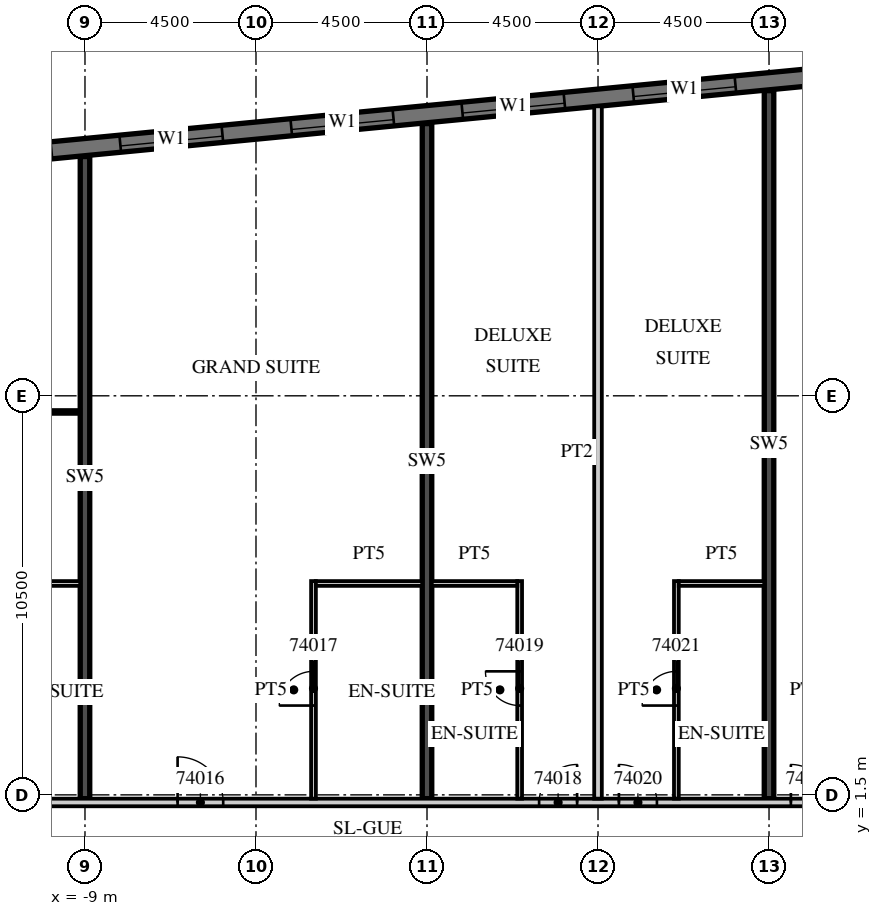
"""IFC4 building model, lengths in metres.
Left out: names, types, materials, properties, quantities, classifications, styles, units other than length and angle.
Written with IfcOpenShell. Run it as: python <this file> out.ifc"""

import sys

from ifc_helpers import new_model, si_unit, direction, frame, frame_2d, origin, place, context, subcontext, project, spatial, rectangle, extrude, element, fill, save


model = new_model("IFC4")
c1 = context("Model", 3, precision=1e-05, world=origin(), true_north=direction((0.0, 1.0)))
c2 = subcontext(c1, "Body", "Model", "MODEL_VIEW")
j1 = project(units=[si_unit("LENGTHUNIT", "METRE"), si_unit("PLANEANGLEUNIT", "RADIAN")], contexts=[c1])
p1 = place(None, origin())
s1 = spatial("IfcSite", under=j1, at=p1, CompositionType="ELEMENT")
p2 = place(p1, origin())
s2 = spatial("IfcBuilding", under=s1, at=p2, CompositionType="ELEMENT")
p3 = place(p2, frame((0.0, 0.0, 294.9)))
s3 = spatial("IfcBuildingStorey", under=s2, at=p3, CompositionType="ELEMENT", Elevation=294.9)
p4 = place(p3, frame((-9.0, 1.4, 0.0), z_axis=(0.0, 0.0, 1.0), x_axis=(0.0, 1.0, 0.0)))
e1 = element("IfcWall", 1, at=p4, inside=s3, PredefinedType="SHEAR", context=c2, shape_type="SweptSolid", body=[
    extrude(rectangle(XDim=16.896, YDim=0.25, at=frame_2d((8.448, 0.0))), origin(), (0.0, 0.0, 1.0), 3.3),
])
p5 = place(p3, frame((0.0, 1.4, 0.0), z_axis=(0.0, 0.0, 1.0), x_axis=(0.0, 1.0, 0.0)))
e2 = element("IfcWall", 2, at=p5, inside=s3, PredefinedType="SHEAR", context=c2, shape_type="SweptSolid", body=[
    extrude(rectangle(XDim=17.763, YDim=0.25, at=frame_2d((8.881, 0.0))), origin(), (0.0, 0.0, 1.0), 3.3),
])
p6 = place(p3, frame((9.0, 1.4, 0.0), z_axis=(0.0, 0.0, 1.0), x_axis=(0.0, 1.0, 0.0)))
e3 = element("IfcWall", 3, at=p6, inside=s3, PredefinedType="SHEAR", context=c2, shape_type="SweptSolid", body=[
    extrude(rectangle(XDim=18.629, YDim=0.25, at=frame_2d((9.315, 0.0))), origin(), (0.0, 0.0, 1.0), 3.3),
])
p7 = place(p3, frame((13.521, 20.713, 0.0), z_axis=(0.0, 0.0, 1.0), x_axis=(-0.995396277313, -0.095844932638, 0.0)))
e4 = element("IfcWall", 4, at=p7, inside=s3, PredefinedType="SOLIDWALL", context=c2, shape_type="SweptSolid", body=[
    extrude(rectangle(XDim=51.495, YDim=0.45, at=frame_2d((25.748, 0.0))), origin(), (0.0, 0.0, 1.0), 3.02),
])
p8 = place(p7, frame((0.91, 0.0, 0.45)))
e5 = element("IfcOpeningElement", 5, at=p8, cuts=e4, PredefinedType="OPENING", context=c2, shape_type="SweptSolid", body=[
    extrude(rectangle(XDim=2.7, YDim=2.25, at=frame_2d((1.35, 1.125))), frame((0.0, 0.235, 0.0), z_axis=(0.0, -1.0, 0.0), x_axis=(1.0, 0.0, 0.0)), (0.0, 0.0, 1.0), 0.47),
])
p9 = place(p7, frame((5.431, 0.0, 0.45)))
e6 = element("IfcOpeningElement", 6, at=p9, cuts=e4, PredefinedType="OPENING", context=c2, shape_type="SweptSolid", body=[
    extrude(rectangle(XDim=2.7, YDim=2.25, at=frame_2d((1.35, 1.125))), frame((0.0, 0.235, 0.0), z_axis=(0.0, -1.0, 0.0), x_axis=(1.0, 0.0, 0.0)), (0.0, 0.0, 1.0), 0.47),
])
p10 = place(p7, frame((9.952, 0.0, 0.45)))
e7 = element("IfcOpeningElement", 7, at=p10, cuts=e4, PredefinedType="OPENING", context=c2, shape_type="SweptSolid", body=[
    extrude(rectangle(XDim=2.7, YDim=2.25, at=frame_2d((1.35, 1.125))), frame((0.0, 0.235, 0.0), z_axis=(0.0, -1.0, 0.0), x_axis=(1.0, 0.0, 0.0)), (0.0, 0.0, 1.0), 0.47),
])
p11 = place(p7, frame((14.473, 0.0, 0.45)))
e8 = element("IfcOpeningElement", 8, at=p11, cuts=e4, PredefinedType="OPENING", context=c2, shape_type="SweptSolid", body=[
    extrude(rectangle(XDim=2.7, YDim=2.25, at=frame_2d((1.35, 1.125))), frame((0.0, 0.235, 0.0), z_axis=(0.0, -1.0, 0.0), x_axis=(1.0, 0.0, 0.0)), (0.0, 0.0, 1.0), 0.47),
])
p12 = place(p7, frame((18.994, 0.0, 0.45)))
e9 = element("IfcOpeningElement", 9, at=p12, cuts=e4, PredefinedType="OPENING", context=c2, shape_type="SweptSolid", body=[
    extrude(rectangle(XDim=2.7, YDim=2.25, at=frame_2d((1.35, 1.125))), frame((0.0, 0.235, 0.0), z_axis=(0.0, -1.0, 0.0), x_axis=(1.0, 0.0, 0.0)), (0.0, 0.0, 1.0), 0.47),
])
p13 = place(p7, frame((23.514, 0.0, 0.45)))
e10 = element("IfcOpeningElement", 10, at=p13, cuts=e4, PredefinedType="OPENING", context=c2, shape_type="SweptSolid", body=[
    extrude(rectangle(XDim=2.7, YDim=2.25, at=frame_2d((1.35, 1.125))), frame((0.0, 0.235, 0.0), z_axis=(0.0, -1.0, 0.0), x_axis=(1.0, 0.0, 0.0)), (0.0, 0.0, 1.0), 0.47),
])
p14 = place(p7, frame((28.035, 0.0, 0.45)))
e11 = element("IfcOpeningElement", 11, at=p14, cuts=e4, PredefinedType="OPENING", context=c2, shape_type="SweptSolid", body=[
    extrude(rectangle(XDim=2.7, YDim=2.25, at=frame_2d((1.35, 1.125))), frame((0.0, 0.235, 0.0), z_axis=(0.0, -1.0, 0.0), x_axis=(1.0, 0.0, 0.0)), (0.0, 0.0, 1.0), 0.47),
])
p15 = place(p7, frame((32.556, 0.0, 0.45)))
e12 = element("IfcOpeningElement", 12, at=p15, cuts=e4, PredefinedType="OPENING", context=c2, shape_type="SweptSolid", body=[
    extrude(rectangle(XDim=2.7, YDim=2.25, at=frame_2d((1.35, 1.125))), frame((0.0, 0.235, 0.0), z_axis=(0.0, -1.0, 0.0), x_axis=(1.0, 0.0, 0.0)), (0.0, 0.0, 1.0), 0.47),
])
p16 = place(p7, frame((37.077, 0.0, 0.45)))
e13 = element("IfcOpeningElement", 13, at=p16, cuts=e4, PredefinedType="OPENING", context=c2, shape_type="SweptSolid", body=[
    extrude(rectangle(XDim=2.7, YDim=2.25, at=frame_2d((1.35, 1.125))), frame((0.0, 0.235, 0.0), z_axis=(0.0, -1.0, 0.0), x_axis=(1.0, 0.0, 0.0)), (0.0, 0.0, 1.0), 0.47),
])
p17 = place(p7, frame((41.598, 0.0, 0.45)))
e14 = element("IfcOpeningElement", 14, at=p17, cuts=e4, PredefinedType="OPENING", context=c2, shape_type="SweptSolid", body=[
    extrude(rectangle(XDim=2.7, YDim=2.25, at=frame_2d((1.35, 1.125))), frame((0.0, 0.235, 0.0), z_axis=(0.0, -1.0, 0.0), x_axis=(1.0, 0.0, 0.0)), (0.0, 0.0, 1.0), 0.47),
])
p18 = place(p7, frame((46.118, 0.0, 0.45)))
e15 = element("IfcOpeningElement", 15, at=p18, cuts=e4, PredefinedType="OPENING", context=c2, shape_type="SweptSolid", body=[
    extrude(rectangle(XDim=2.7, YDim=2.25, at=frame_2d((1.35, 1.125))), frame((0.0, 0.235, 0.0), z_axis=(0.0, -1.0, 0.0), x_axis=(1.0, 0.0, 0.0)), (0.0, 0.0, 1.0), 0.47),
])
p19 = place(p3, frame((-39.909, 1.3, 0.0), z_axis=(0.0, 0.0, 1.0), x_axis=(1.0, 0.0, 0.0)))
e16 = element("IfcWall", 16, at=p19, inside=s3, PredefinedType="PARTITIONING", context=c2, shape_type="SweptSolid", body=[
    extrude(rectangle(XDim=53.409, YDim=0.2, at=frame_2d((26.705, 0.0))), origin(), (0.0, 0.0, 1.0), 3.02),
])
p20 = place(p19, frame((0.255, 0.0, 0.0)))
e17 = element("IfcOpeningElement", 17, at=p20, cuts=e16, PredefinedType="OPENING", context=c2, shape_type="SweptSolid", body=[
    extrude(rectangle(XDim=0.9, YDim=2.1, at=frame_2d((0.45, 1.05))), frame((0.0, 0.11, 0.0), z_axis=(0.0, -1.0, 0.0), x_axis=(1.0, 0.0, 0.0)), (0.0, 0.0, 1.0), 0.22),
])
p21 = place(p19, frame((4.484, 0.0, 0.0)))
e18 = element("IfcOpeningElement", 18, at=p21, cuts=e16, PredefinedType="OPENING", context=c2, shape_type="SweptSolid", body=[
    extrude(rectangle(XDim=1.0, YDim=2.1, at=frame_2d((0.5, 1.05))), frame((0.0, 0.11, 0.0), z_axis=(0.0, -1.0, 0.0), x_axis=(1.0, 0.0, 0.0)), (0.0, 0.0, 1.0), 0.22),
])
p22 = place(p19, frame((11.334, 0.0, 0.0)))
e19 = element("IfcOpeningElement", 19, at=p22, cuts=e16, PredefinedType="OPENING", context=c2, shape_type="SweptSolid", body=[
    extrude(rectangle(XDim=1.0, YDim=2.1, at=frame_2d((0.5, 1.05))), frame((0.0, 0.11, 0.0), z_axis=(0.0, -1.0, 0.0), x_axis=(1.0, 0.0, 0.0)), (0.0, 0.0, 1.0), 0.22),
])
p23 = place(p19, frame((15.347, 0.0, 0.0)))
e20 = element("IfcOpeningElement", 20, at=p23, cuts=e16, PredefinedType="OPENING", context=c2, shape_type="SweptSolid", body=[
    extrude(rectangle(XDim=1.2, YDim=2.1, at=frame_2d((0.6, 1.05))), frame((0.0, 0.11, 0.0), z_axis=(0.0, -1.0, 0.0), x_axis=(1.0, 0.0, 0.0)), (0.0, 0.0, 1.0), 0.22),
])
p24 = place(p19, frame((24.859, 0.0, 0.0)))
e21 = element("IfcOpeningElement", 21, at=p24, cuts=e16, PredefinedType="OPENING", context=c2, shape_type="SweptSolid", body=[
    extrude(rectangle(XDim=1.0, YDim=2.1, at=frame_2d((0.5, 1.05))), frame((0.0, 0.11, 0.0), z_axis=(0.0, -1.0, 0.0), x_axis=(1.0, 0.0, 0.0)), (0.0, 0.0, 1.0), 0.22),
])
p25 = place(p19, frame((26.959, 0.0, 0.0)))
e22 = element("IfcOpeningElement", 22, at=p25, cuts=e16, PredefinedType="OPENING", context=c2, shape_type="SweptSolid", body=[
    extrude(rectangle(XDim=1.0, YDim=2.1, at=frame_2d((0.5, 1.05))), frame((0.0, 0.11, 0.0), z_axis=(0.0, -1.0, 0.0), x_axis=(1.0, 0.0, 0.0)), (0.0, 0.0, 1.0), 0.22),
])
p26 = place(p19, frame((33.346, 0.0, 0.0)))
e23 = element("IfcOpeningElement", 23, at=p26, cuts=e16, PredefinedType="OPENING", context=c2, shape_type="SweptSolid", body=[
    extrude(rectangle(XDim=1.2, YDim=2.1, at=frame_2d((0.6, 1.05))), frame((0.0, 0.11, 0.0), z_axis=(0.0, -1.0, 0.0), x_axis=(1.0, 0.0, 0.0)), (0.0, 0.0, 1.0), 0.22),
])
p27 = place(p19, frame((42.859, 0.0, 0.0)))
e24 = element("IfcOpeningElement", 24, at=p27, cuts=e16, PredefinedType="OPENING", context=c2, shape_type="SweptSolid", body=[
    extrude(rectangle(XDim=1.0, YDim=2.1, at=frame_2d((0.5, 1.05))), frame((0.0, 0.11, 0.0), z_axis=(0.0, -1.0, 0.0), x_axis=(1.0, 0.0, 0.0)), (0.0, 0.0, 1.0), 0.22),
])
p28 = place(p19, frame((44.959, 0.0, 0.0)))
e25 = element("IfcOpeningElement", 25, at=p28, cuts=e16, PredefinedType="OPENING", context=c2, shape_type="SweptSolid", body=[
    extrude(rectangle(XDim=1.0, YDim=2.1, at=frame_2d((0.5, 1.05))), frame((0.0, 0.11, 0.0), z_axis=(0.0, -1.0, 0.0), x_axis=(1.0, 0.0, 0.0)), (0.0, 0.0, 1.0), 0.22),
])
p29 = place(p19, frame((49.484, 0.0, 0.0)))
e26 = element("IfcOpeningElement", 26, at=p29, cuts=e16, PredefinedType="OPENING", context=c2, shape_type="SweptSolid", body=[
    extrude(rectangle(XDim=1.0, YDim=2.1, at=frame_2d((0.5, 1.05))), frame((0.0, 0.11, 0.0), z_axis=(0.0, -1.0, 0.0), x_axis=(1.0, 0.0, 0.0)), (0.0, 0.0, 1.0), 0.22),
])
p30 = place(p3, frame((-11.375, 7.062, 0.0), z_axis=(0.0, 0.0, 1.0), x_axis=(1.0, 0.0, 0.0)))
e27 = element("IfcWall", 27, at=p30, inside=s3, PredefinedType="PARTITIONING", context=c2, shape_type="SweptSolid", body=[
    extrude(rectangle(XDim=2.25, YDim=0.125, at=frame_2d((1.125, 0.0))), origin(), (0.0, 0.0, 1.0), 3.02),
])
p31 = place(p3, frame((-13.4, 11.575, 0.0), z_axis=(0.0, 0.0, 1.0), x_axis=(1.0, 0.0, 0.0)))
e28 = element("IfcWall", 28, at=p31, inside=s3, PredefinedType="PARTITIONING", context=c2, shape_type="SweptSolid", body=[
    extrude(rectangle(XDim=4.275, YDim=0.1, at=frame_2d((2.137, 0.0))), origin(), (0.0, 0.0, 1.0), 3.02),
])
p32 = place(p31, frame((0.788, 0.0, 0.0)))
e29 = element("IfcOpeningElement", 29, at=p32, cuts=e28, PredefinedType="OPENING", context=c2, shape_type="SweptSolid", body=[
    extrude(rectangle(XDim=1.5, YDim=2.1, at=frame_2d((0.75, 1.05))), frame((0.0, 0.06, 0.0), z_axis=(0.0, -1.0, 0.0), x_axis=(1.0, 0.0, 0.0)), (0.0, 0.0, 1.0), 0.12),
])
p33 = place(p3, frame((-2.987, 1.4, 0.0), z_axis=(0.0, 0.0, 1.0), x_axis=(0.0, 1.0, 0.0)))
e30 = element("IfcWall", 30, at=p33, inside=s3, PredefinedType="PARTITIONING", context=c2, shape_type="SweptSolid", body=[
    extrude(rectangle(XDim=5.725, YDim=0.125, at=frame_2d((2.863, 0.0))), origin(), (0.0, 0.0, 1.0), 3.02),
])
p34 = place(p33, frame((2.45, 0.0, 0.0)))
e31 = element("IfcOpeningElement", 31, at=p34, cuts=e30, PredefinedType="OPENING", context=c2, shape_type="SweptSolid", body=[
    extrude(rectangle(XDim=0.9, YDim=2.1, at=frame_2d((0.45, 1.05))), frame((0.0, 0.073, 0.0), z_axis=(0.0, -1.0, 0.0), x_axis=(1.0, 0.0, 0.0)), (0.0, 0.0, 1.0), 0.145),
])
p35 = place(p3, frame((-2.925, 7.062, 0.0), z_axis=(0.0, 0.0, 1.0), x_axis=(1.0, 0.0, 0.0)))
e32 = element("IfcWall", 32, at=p35, inside=s3, PredefinedType="PARTITIONING", context=c2, shape_type="SweptSolid", body=[
    extrude(rectangle(XDim=2.8, YDim=0.125, at=frame_2d((1.4, 0.0))), origin(), (0.0, 0.0, 1.0), 3.02),
])
p36 = place(p3, frame((4.5, 1.4, 0.0), z_axis=(0.0, 0.0, 1.0), x_axis=(0.0, 1.0, 0.0)))
e33 = element("IfcWall", 33, at=p36, inside=s3, PredefinedType="PARTITIONING", context=c2, shape_type="SweptSolid", body=[
    extrude(rectangle(XDim=18.218, YDim=0.2, at=frame_2d((9.109, 0.0))), origin(), (0.0, 0.0, 1.0), 3.02),
])
p37 = place(p3, frame((2.438, 1.4, 0.0), z_axis=(0.0, 0.0, 1.0), x_axis=(0.0, 1.0, 0.0)))
e34 = element("IfcWall", 34, at=p37, inside=s3, PredefinedType="PARTITIONING", context=c2, shape_type="SweptSolid", body=[
    extrude(rectangle(XDim=5.725, YDim=0.125, at=frame_2d((2.863, 0.0))), origin(), (0.0, 0.0, 1.0), 3.02),
])
p38 = place(p37, frame((2.45, 0.0, 0.0)))
e35 = element("IfcOpeningElement", 35, at=p38, cuts=e34, PredefinedType="OPENING", context=c2, shape_type="SweptSolid", body=[
    extrude(rectangle(XDim=0.9, YDim=2.1, at=frame_2d((0.45, 1.05))), frame((0.0, 0.073, 0.0), z_axis=(0.0, -1.0, 0.0), x_axis=(1.0, 0.0, 0.0)), (0.0, 0.0, 1.0), 0.145),
])
p39 = place(p3, frame((0.125, 7.062, 0.0), z_axis=(0.0, 0.0, 1.0), x_axis=(1.0, 0.0, 0.0)))
e36 = element("IfcWall", 36, at=p39, inside=s3, PredefinedType="PARTITIONING", context=c2, shape_type="SweptSolid", body=[
    extrude(rectangle(XDim=2.25, YDim=0.125, at=frame_2d((1.125, 0.0))), origin(), (0.0, 0.0, 1.0), 3.02),
])
p40 = place(p3, frame((6.562, 1.4, 0.0), z_axis=(0.0, 0.0, 1.0), x_axis=(0.0, 1.0, 0.0)))
e37 = element("IfcWall", 37, at=p40, inside=s3, PredefinedType="PARTITIONING", context=c2, shape_type="SweptSolid", body=[
    extrude(rectangle(XDim=5.725, YDim=0.125, at=frame_2d((2.863, 0.0))), origin(), (0.0, 0.0, 1.0), 3.02),
])
p41 = place(p40, frame((2.45, 0.0, 0.0)))
e38 = element("IfcOpeningElement", 38, at=p41, cuts=e37, PredefinedType="OPENING", context=c2, shape_type="SweptSolid", body=[
    extrude(rectangle(XDim=0.9, YDim=2.1, at=frame_2d((0.45, 1.05))), frame((0.0, 0.073, 0.0), z_axis=(0.0, -1.0, 0.0), x_axis=(1.0, 0.0, 0.0)), (0.0, 0.0, 1.0), 0.145),
])
p42 = place(p3, frame((6.625, 7.062, 0.0), z_axis=(0.0, 0.0, 1.0), x_axis=(1.0, 0.0, 0.0)))
e39 = element("IfcWall", 39, at=p42, inside=s3, PredefinedType="PARTITIONING", context=c2, shape_type="SweptSolid", body=[
    extrude(rectangle(XDim=2.25, YDim=0.125, at=frame_2d((1.125, 0.0))), origin(), (0.0, 0.0, 1.0), 3.02),
])
p43 = place(p9, origin())
e40 = element("IfcWindow", 40, at=p43, inside=s3, PartitioningType="SINGLE_PANEL", PredefinedType="WINDOW", context=c2, shape_type="SweptSolid", body=[
    extrude(rectangle(XDim=2.7, YDim=2.25, at=frame_2d((1.35, 1.125))), frame((0.0, 0.09, 0.0), z_axis=(0.0, -1.0, 0.0), x_axis=(1.0, 0.0, 0.0)), (0.0, 0.0, 1.0), 0.06),
])
fill(e6, e40)
p44 = place(p10, origin())
e41 = element("IfcWindow", 41, at=p44, inside=s3, PartitioningType="SINGLE_PANEL", PredefinedType="WINDOW", context=c2, shape_type="SweptSolid", body=[
    extrude(rectangle(XDim=2.7, YDim=2.25, at=frame_2d((1.35, 1.125))), frame((0.0, 0.09, 0.0), z_axis=(0.0, -1.0, 0.0), x_axis=(1.0, 0.0, 0.0)), (0.0, 0.0, 1.0), 0.06),
])
fill(e7, e41)
p45 = place(p11, origin())
e42 = element("IfcWindow", 42, at=p45, inside=s3, PartitioningType="SINGLE_PANEL", PredefinedType="WINDOW", context=c2, shape_type="SweptSolid", body=[
    extrude(rectangle(XDim=2.7, YDim=2.25, at=frame_2d((1.35, 1.125))), frame((0.0, 0.09, 0.0), z_axis=(0.0, -1.0, 0.0), x_axis=(1.0, 0.0, 0.0)), (0.0, 0.0, 1.0), 0.06),
])
fill(e8, e42)
p46 = place(p12, origin())
e43 = element("IfcWindow", 43, at=p46, inside=s3, PartitioningType="SINGLE_PANEL", PredefinedType="WINDOW", context=c2, shape_type="SweptSolid", body=[
    extrude(rectangle(XDim=2.7, YDim=2.25, at=frame_2d((1.35, 1.125))), frame((0.0, 0.09, 0.0), z_axis=(0.0, -1.0, 0.0), x_axis=(1.0, 0.0, 0.0)), (0.0, 0.0, 1.0), 0.06),
])
fill(e9, e43)
p47 = place(p26, origin())
e44 = element("IfcDoor", 44, at=p47, inside=s3, OperationType="SINGLE_SWING_LEFT", PredefinedType="DOOR", context=c2, shape_type="SweptSolid", body=[
    extrude(rectangle(XDim=1.2, YDim=2.1, at=frame_2d((0.6, 1.05))), frame((0.0, 0.025, 0.0), z_axis=(0.0, -1.0, 0.0), x_axis=(1.0, 0.0, 0.0)), (0.0, 0.0, 1.0), 0.05),
])
fill(e23, e44)
p48 = place(p34, origin())
e45 = element("IfcDoor", 45, at=p48, inside=s3, OperationType="SINGLE_SWING_LEFT", PredefinedType="DOOR", context=c2, shape_type="SweptSolid", body=[
    extrude(rectangle(XDim=0.9, YDim=2.1, at=frame_2d((0.45, 1.05))), frame((0.0, 0.025, 0.0), z_axis=(0.0, -1.0, 0.0), x_axis=(1.0, 0.0, 0.0)), (0.0, 0.0, 1.0), 0.05),
])
fill(e31, e45)
p49 = place(p27, origin())
e46 = element("IfcDoor", 46, at=p49, inside=s3, OperationType="SINGLE_SWING_RIGHT", PredefinedType="DOOR", context=c2, shape_type="SweptSolid", body=[
    extrude(rectangle(XDim=1.0, YDim=2.1, at=frame_2d((0.5, 1.05))), frame((0.0, 0.025, 0.0), z_axis=(0.0, -1.0, 0.0), x_axis=(1.0, 0.0, 0.0)), (0.0, 0.0, 1.0), 0.05),
])
fill(e24, e46)
p50 = place(p38, origin())
e47 = element("IfcDoor", 47, at=p50, inside=s3, OperationType="SINGLE_SWING_RIGHT", PredefinedType="DOOR", context=c2, shape_type="SweptSolid", body=[
    extrude(rectangle(XDim=0.9, YDim=2.1, at=frame_2d((0.45, 1.05))), frame((0.0, 0.025, 0.0), z_axis=(0.0, -1.0, 0.0), x_axis=(1.0, 0.0, 0.0)), (0.0, 0.0, 1.0), 0.05),
])
fill(e35, e47)
p51 = place(p28, origin())
e48 = element("IfcDoor", 48, at=p51, inside=s3, OperationType="SINGLE_SWING_LEFT", PredefinedType="DOOR", context=c2, shape_type="SweptSolid", body=[
    extrude(rectangle(XDim=1.0, YDim=2.1, at=frame_2d((0.5, 1.05))), frame((0.0, 0.025, 0.0), z_axis=(0.0, -1.0, 0.0), x_axis=(1.0, 0.0, 0.0)), (0.0, 0.0, 1.0), 0.05),
])
fill(e25, e48)
p52 = place(p41, origin())
e49 = element("IfcDoor", 49, at=p52, inside=s3, OperationType="SINGLE_SWING_LEFT", PredefinedType="DOOR", context=c2, shape_type="SweptSolid", body=[
    extrude(rectangle(XDim=0.9, YDim=2.1, at=frame_2d((0.45, 1.05))), frame((0.0, 0.025, 0.0), z_axis=(0.0, -1.0, 0.0), x_axis=(1.0, 0.0, 0.0)), (0.0, 0.0, 1.0), 0.05),
])
fill(e38, e49)
p53 = place(p29, origin())
e50 = element("IfcDoor", 50, at=p53, inside=s3, OperationType="SINGLE_SWING_LEFT", PredefinedType="DOOR", context=c2, shape_type="SweptSolid", body=[
    extrude(rectangle(XDim=1.0, YDim=2.1, at=frame_2d((0.5, 1.05))), frame((0.0, 0.025, 0.0), z_axis=(0.0, -1.0, 0.0), x_axis=(1.0, 0.0, 0.0)), (0.0, 0.0, 1.0), 0.05),
])
fill(e26, e50)
save(model, sys.argv[1])
